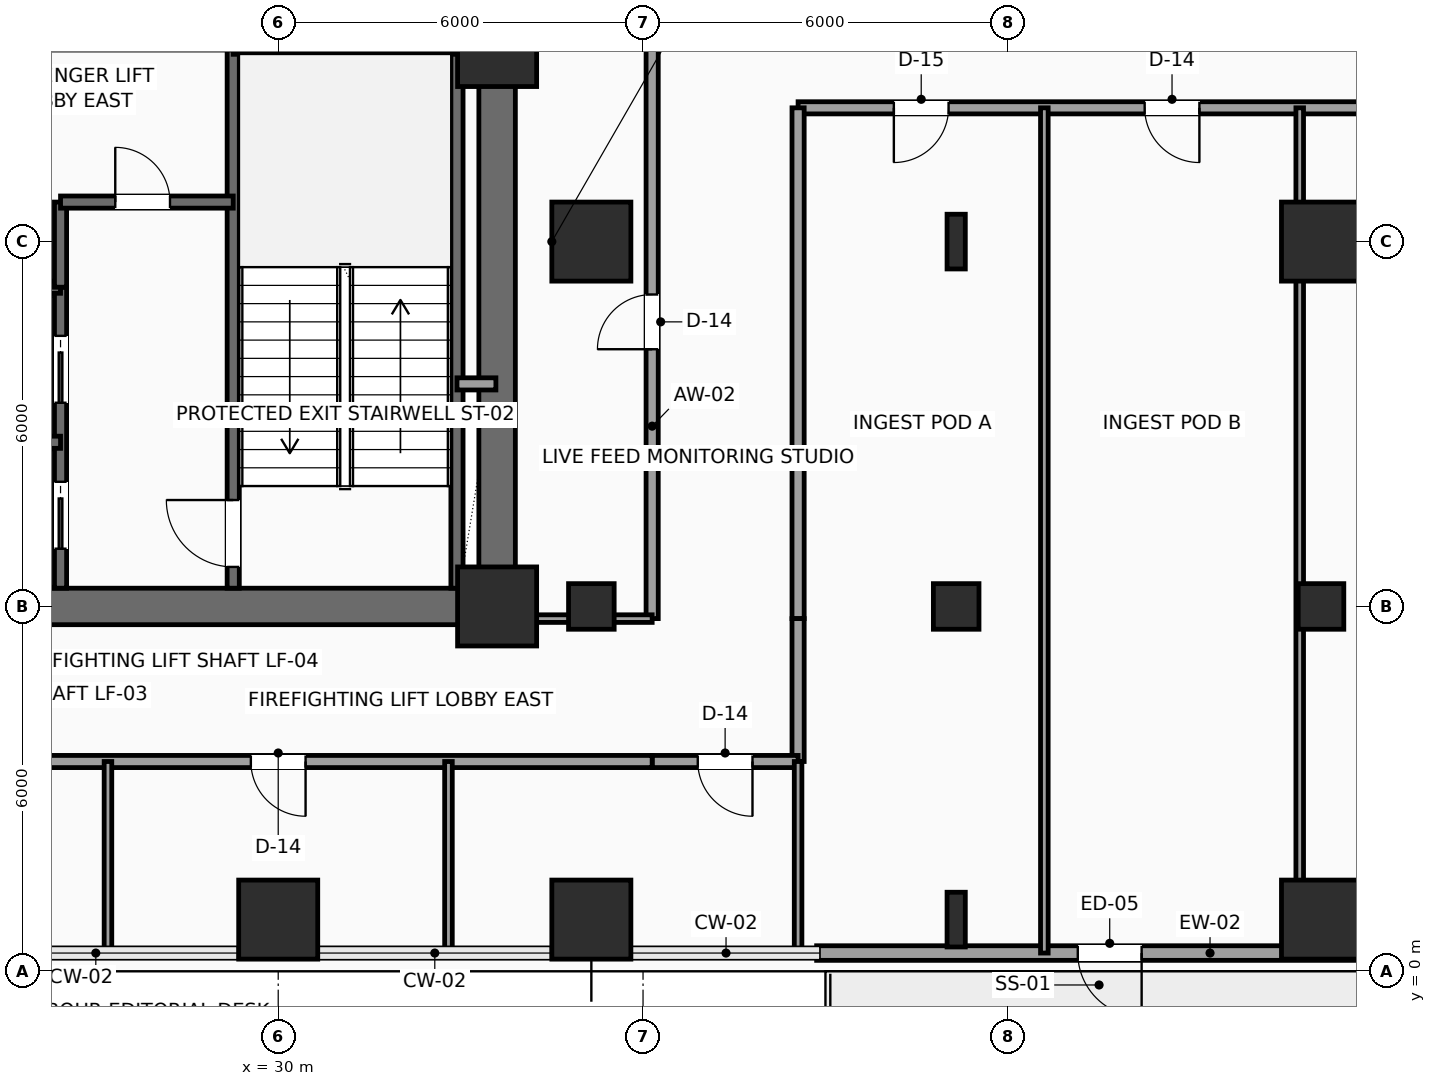
"""IFC4 building model, lengths in metres.
Left out: names, types, materials, properties, quantities, classifications, styles, units other than length and angle.
Written with IfcOpenShell. Run it as: python <this file> out.ifc"""

import sys

from ifc_helpers import new_model, si_unit, direction, frame, frame_2d, origin, origin_2d, place, context, subcontext, project, spatial, rectangle, hollow_rectangle, i_section, extrude, element, fill, save


model = new_model("IFC4")
c1 = context("Model", 3, precision=1e-05, world=origin(), true_north=direction((0.0, 1.0)))
c2 = subcontext(c1, "Body", "Model", "MODEL_VIEW")
j1 = project(units=[si_unit("LENGTHUNIT", "METRE"), si_unit("PLANEANGLEUNIT", "RADIAN")], contexts=[c1])
p1 = place(None, origin())
s1 = spatial("IfcSite", under=j1, at=p1, CompositionType="ELEMENT")
p2 = place(p1, origin())
s2 = spatial("IfcBuilding", under=s1, at=p2, CompositionType="ELEMENT")
p3 = place(p2, frame((0.0, 0.0, 44.1)))
s3 = spatial("IfcBuildingStorey", under=s2, at=p3, CompositionType="ELEMENT", Elevation=44.1)
for number, where, z_axis, x_axis in (
    (1, (33.6, 6.0, 0.0), (0.0, 0.0, 1.0), (1.0, 0.0, 0.0)),
    (2, (33.6, 15.2, 0.0), (0.0, 0.0, 1.0), (1.0, 0.0, 0.0)),
    (3, (30.0, 0.85, 0.0), (0.0, 0.0, 1.0), (1.0, 0.0, 0.0)),
    (4, (35.15, 0.85, 0.0), (0.0, 0.0, 1.0), (1.0, 0.0, 0.0)),
):
    element("IfcColumn", number, at=place(p3, frame(where, z_axis=z_axis, x_axis=x_axis)), inside=s3, PredefinedType="COLUMN", context=c2, shape_type="SweptSolid", body=[
        extrude(rectangle(XDim=1.3, YDim=1.3, at=origin_2d()), origin(), (0.0, 0.0, 1.0), 3.9),
    ])
p4 = place(p3, frame((35.15, 6.0, 0.0), z_axis=(0.0, 0.0, 1.0), x_axis=(1.0, 0.0, 0.0)))
e5 = element("IfcColumn", 5, at=p4, inside=s3, PredefinedType="COLUMN", context=c2, shape_type="SweptSolid", body=[
    extrude(hollow_rectangle(XDim=0.75, YDim=0.75, WallThickness=0.035, InnerFilletRadius=0.035, OuterFilletRadius=0.05, at=origin_2d()), origin(), (0.0, 0.0, 1.0), 3.9),
])
p5 = place(p3, frame((35.15, 12.0, 0.0), z_axis=(0.0, 0.0, 1.0), x_axis=(1.0, 0.0, 0.0)))
e6 = element("IfcColumn", 6, at=p5, inside=s3, PredefinedType="COLUMN", context=c2, shape_type="SweptSolid", body=[
    extrude(rectangle(XDim=1.3, YDim=1.3, at=origin_2d()), origin(), (0.0, 0.0, 1.0), 3.9),
])
p6 = place(p3, frame((41.15, 0.85, 0.0), z_axis=(0.0, 0.0, 1.0), x_axis=(1.0, 0.0, 0.0)))
e7 = element("IfcColumn", 7, at=p6, inside=s3, PredefinedType="COLUMN", context=c2, shape_type="SweptSolid", body=[
    extrude(i_section(OverallWidth=0.3, OverallDepth=0.9, WebThickness=0.019, FlangeThickness=0.035, FilletRadius=0.03, at=origin_2d()), origin(), (0.0, 0.0, 1.0), 3.9),
])
p7 = place(p3, frame((41.15, 6.0, 0.0), z_axis=(0.0, 0.0, 1.0), x_axis=(1.0, 0.0, 0.0)))
e8 = element("IfcColumn", 8, at=p7, inside=s3, PredefinedType="COLUMN", context=c2, shape_type="SweptSolid", body=[
    extrude(hollow_rectangle(XDim=0.75, YDim=0.75, WallThickness=0.035, InnerFilletRadius=0.035, OuterFilletRadius=0.05, at=origin_2d()), origin(), (0.0, 0.0, 1.0), 3.9),
])
p8 = place(p3, frame((41.15, 12.0, 0.0), z_axis=(0.0, 0.0, 1.0), x_axis=(1.0, 0.0, 0.0)))
e9 = element("IfcColumn", 9, at=p8, inside=s3, PredefinedType="COLUMN", context=c2, shape_type="SweptSolid", body=[
    extrude(i_section(OverallWidth=0.3, OverallDepth=0.9, WebThickness=0.019, FlangeThickness=0.035, FilletRadius=0.03, at=origin_2d()), origin(), (0.0, 0.0, 1.0), 3.9),
])
p9 = place(p3, frame((47.15, 0.85, 0.0), z_axis=(0.0, 0.0, 1.0), x_axis=(1.0, 0.0, 0.0)))
e10 = element("IfcColumn", 10, at=p9, inside=s3, PredefinedType="COLUMN", context=c2, shape_type="SweptSolid", body=[
    extrude(rectangle(XDim=1.3, YDim=1.3, at=origin_2d()), origin(), (0.0, 0.0, 1.0), 3.9),
])
p10 = place(p3, frame((47.15, 6.0, 0.0), z_axis=(0.0, 0.0, 1.0), x_axis=(1.0, 0.0, 0.0)))
e11 = element("IfcColumn", 11, at=p10, inside=s3, PredefinedType="COLUMN", context=c2, shape_type="SweptSolid", body=[
    extrude(hollow_rectangle(XDim=0.75, YDim=0.75, WallThickness=0.035, InnerFilletRadius=0.035, OuterFilletRadius=0.05, at=origin_2d()), origin(), (0.0, 0.0, 1.0), 3.9),
])
p11 = place(p3, frame((47.15, 12.0, 0.0), z_axis=(0.0, 0.0, 1.0), x_axis=(1.0, 0.0, 0.0)))
e12 = element("IfcColumn", 12, at=p11, inside=s3, PredefinedType="COLUMN", context=c2, shape_type="SweptSolid", body=[
    extrude(rectangle(XDim=1.3, YDim=1.3, at=origin_2d()), origin(), (0.0, 0.0, 1.0), 3.9),
])
p12 = place(p3, frame((48.145, 0.3, 0.0), z_axis=(0.0, 0.0, 1.0), x_axis=(-1.0, 0.0, 0.0)))
e13 = element("IfcWall", 13, at=p12, inside=s3, PredefinedType="SOLIDWALL", context=c2, shape_type="SweptSolid", body=[
    extrude(rectangle(XDim=9.29, YDim=0.24, at=frame_2d((4.645, 0.0))), origin(), (0.0, 0.0, 1.0), 3.65),
])
p13 = place(p12, frame((3.945, 0.0, 0.0)))
e14 = element("IfcOpeningElement", 14, at=p13, cuts=e13, PredefinedType="OPENING", context=c2, shape_type="SweptSolid", body=[
    extrude(rectangle(XDim=1.05, YDim=2.2, at=frame_2d((0.525, 1.1))), frame((0.0, 0.13, 0.0), z_axis=(0.0, -1.0, 0.0), x_axis=(1.0, 0.0, 0.0)), (0.0, 0.0, 1.0), 0.26),
])
p14 = place(p3, frame((24.0, 6.0, 0.0), z_axis=(0.0, 0.0, 1.0), x_axis=(1.0, 0.0, 0.0)))
e15 = element("IfcWall", 15, at=p14, inside=s3, PredefinedType="SHEAR", context=c2, shape_type="SweptSolid", body=[
    extrude(rectangle(XDim=9.6, YDim=0.6, at=frame_2d((4.8, 0.0))), origin(), (0.0, 0.0, 1.0), 3.65),
])
p15 = place(p3, frame((33.6, 6.0, 0.0), z_axis=(0.0, 0.0, 1.0), x_axis=(0.0, 1.0, 0.0)))
e16 = element("IfcWall", 16, at=p15, inside=s3, PredefinedType="SHEAR", context=c2, shape_type="SweptSolid", body=[
    extrude(rectangle(XDim=12.0, YDim=0.6, at=frame_2d((6.0, 0.0))), origin(), (0.0, 0.0, 1.0), 3.65),
])
p16 = place(p15, frame((10.2, 0.0, 0.0)))
e17 = element("IfcOpeningElement", 17, at=p16, cuts=e16, PredefinedType="OPENING", context=c2, shape_type="SweptSolid", body=[
    extrude(rectangle(XDim=0.9, YDim=2.15, at=frame_2d((0.45, 1.075))), frame((0.0, 0.31, 0.0), z_axis=(0.0, -1.0, 0.0), x_axis=(1.0, 0.0, 0.0)), (0.0, 0.0, 1.0), 0.62),
])
p17 = place(p3, frame((29.26, 6.3, 0.0), z_axis=(0.0, 0.0, 1.0), x_axis=(0.0, 1.0, 0.0)))
e18 = element("IfcWall", 18, at=p17, inside=s3, PredefinedType="SHEAR", context=c2, shape_type="SweptSolid", body=[
    extrude(rectangle(XDim=8.88, YDim=0.2, at=frame_2d((4.44, 0.0))), origin(), (0.0, 0.0, 1.0), 3.65),
])
p18 = place(p17, frame((0.35, 0.0, 0.0)))
e19 = element("IfcOpeningElement", 19, at=p18, cuts=e18, PredefinedType="OPENING", context=c2, shape_type="SweptSolid", body=[
    extrude(rectangle(XDim=1.1, YDim=2.2, at=frame_2d((0.55, 1.1))), frame((0.0, 0.11, 0.0), z_axis=(0.0, -1.0, 0.0), x_axis=(1.0, 0.0, 0.0)), (0.0, 0.0, 1.0), 0.22),
])
p19 = place(p3, frame((32.94, 6.3, 0.0), z_axis=(0.0, 0.0, 1.0), x_axis=(0.0, 1.0, 0.0)))
e20 = element("IfcWall", 20, at=p19, inside=s3, PredefinedType="SHEAR", context=c2, shape_type="SweptSolid", body=[
    extrude(rectangle(XDim=8.88, YDim=0.2, at=frame_2d((4.44, 0.0))), origin(), (0.0, 0.0, 1.0), 3.65),
])
p20 = place(p3, frame((29.26, 15.18, 0.0), z_axis=(0.0, 0.0, 1.0), x_axis=(1.0, 0.0, 0.0)))
e21 = element("IfcWall", 21, at=p20, inside=s3, PredefinedType="SHEAR", context=c2, shape_type="SweptSolid", body=[
    extrude(rectangle(XDim=4.04, YDim=0.2, at=frame_2d((2.02, 0.0))), origin(), (0.0, 0.0, 1.0), 3.65),
])
p21 = place(p3, frame((26.42, 6.3, 0.0), z_axis=(0.0, 0.0, 1.0), x_axis=(0.0, 1.0, 0.0)))
e22 = element("IfcWall", 22, at=p21, inside=s3, PredefinedType="SHEAR", context=c2, shape_type="SweptSolid", body=[
    extrude(rectangle(XDim=4.95, YDim=0.2, at=frame_2d((2.475, 0.0))), origin(), (0.0, 0.0, 1.0), 3.65),
])
p22 = place(p21, frame((0.65, 0.0, 0.0)))
e23 = element("IfcOpeningElement", 23, at=p22, cuts=e22, PredefinedType="OPENING", context=c2, shape_type="SweptSolid", body=[
    extrude(rectangle(XDim=1.1, YDim=2.2, at=frame_2d((0.55, 1.1))), frame((0.0, 0.11, 0.0), z_axis=(0.0, -1.0, 0.0), x_axis=(1.0, 0.0, 0.0)), (0.0, 0.0, 1.0), 0.22),
])
p23 = place(p21, frame((3.05, 0.0, 0.0)))
e24 = element("IfcOpeningElement", 24, at=p23, cuts=e22, PredefinedType="OPENING", context=c2, shape_type="SweptSolid", body=[
    extrude(rectangle(XDim=1.1, YDim=2.2, at=frame_2d((0.55, 1.1))), frame((0.0, 0.11, 0.0), z_axis=(0.0, -1.0, 0.0), x_axis=(1.0, 0.0, 0.0)), (0.0, 0.0, 1.0), 0.22),
])
for number, where, z_axis, x_axis in (
    (25, (24.25, 8.7, 0.0), (0.0, 0.0, 1.0), (1.0, 0.0, 0.0)),
    (26, (24.25, 11.25, 0.0), (0.0, 0.0, 1.0), (1.0, 0.0, 0.0)),
):
    element("IfcWall", number, at=place(p3, frame(where, z_axis=z_axis, x_axis=x_axis)), inside=s3, PredefinedType="SHEAR", context=c2, shape_type="SweptSolid", body=[
        extrude(rectangle(XDim=2.17, YDim=0.2, at=frame_2d((1.085, 0.0))), origin(), (0.0, 0.0, 1.0), 3.65),
    ])
p24 = place(p3, frame((26.42, 11.25, 0.0), z_axis=(0.0, 0.0, 1.0), x_axis=(0.0, 1.0, 0.0)))
e27 = element("IfcWall", 27, at=p24, inside=s3, PredefinedType="SHEAR", context=c2, shape_type="SweptSolid", body=[
    extrude(rectangle(XDim=1.4, YDim=0.2, at=frame_2d((0.7, 0.0))), origin(), (0.0, 0.0, 1.0), 3.65),
])
p25 = place(p3, frame((26.42, 12.65, 0.0), z_axis=(0.0, 0.0, 1.0), x_axis=(1.0, 0.0, 0.0)))
e28 = element("IfcWall", 28, at=p25, inside=s3, PredefinedType="SHEAR", context=c2, shape_type="SweptSolid", body=[
    extrude(rectangle(XDim=2.84, YDim=0.2, at=frame_2d((1.42, 0.0))), origin(), (0.0, 0.0, 1.0), 3.65),
])
p26 = place(p25, frame((0.9, 0.0, 0.0)))
e29 = element("IfcOpeningElement", 29, at=p26, cuts=e28, PredefinedType="OPENING", context=c2, shape_type="SweptSolid", body=[
    extrude(rectangle(XDim=0.9, YDim=2.15, at=frame_2d((0.45, 1.075))), frame((0.0, 0.11, 0.0), z_axis=(0.0, -1.0, 0.0), x_axis=(1.0, 0.0, 0.0)), (0.0, 0.0, 1.0), 0.22),
])
p27 = place(p3, frame((32.94, 9.66, 0.0), z_axis=(0.0, 0.0, 1.0), x_axis=(1.0, 0.0, 0.0)))
e30 = element("IfcWall", 30, at=p27, inside=s3, PredefinedType="SOLIDWALL", context=c2, shape_type="SweptSolid", body=[
    extrude(rectangle(XDim=0.64, YDim=0.2, at=frame_2d((0.32, 0.0))), origin(), (0.0, 0.0, 1.0), 3.65),
])
p28 = place(p3, frame((36.15, 5.8, 0.0), z_axis=(0.0, 0.0, 1.0), x_axis=(0.0, 1.0, 0.0)))
e31 = element("IfcWall", 31, at=p28, inside=s3, PredefinedType="PARTITIONING", context=c2, shape_type="SweptSolid", body=[
    extrude(rectangle(XDim=10.08, YDim=0.2, at=frame_2d((5.04, 0.0))), origin(), (0.0, 0.0, 1.0), 3.65),
])
p29 = place(p28, frame((4.43, 0.0, 0.0)))
e32 = element("IfcOpeningElement", 32, at=p29, cuts=e31, PredefinedType="OPENING", context=c2, shape_type="SweptSolid", body=[
    extrude(rectangle(XDim=0.9, YDim=2.1, at=frame_2d((0.45, 1.05))), frame((0.0, 0.11, 0.0), z_axis=(0.0, -1.0, 0.0), x_axis=(1.0, 0.0, 0.0)), (0.0, 0.0, 1.0), 0.22),
])
p30 = place(p3, frame((50.9, 14.2, 0.0), z_axis=(0.0, 0.0, 1.0), x_axis=(-1.0, 0.0, 0.0)))
e33 = element("IfcWall", 33, at=p30, inside=s3, PredefinedType="PARTITIONING", context=c2, shape_type="SweptSolid", body=[
    extrude(rectangle(XDim=12.35, YDim=0.2, at=frame_2d((6.175, 0.0))), origin(), (0.0, 0.0, 1.0), 3.65),
])
p31 = place(p30, frame((9.875, 0.0, 0.0)))
e34 = element("IfcOpeningElement", 34, at=p31, cuts=e33, PredefinedType="OPENING", context=c2, shape_type="SweptSolid", body=[
    extrude(rectangle(XDim=0.9, YDim=2.1, at=frame_2d((0.45, 1.05))), frame((0.0, 0.11, 0.0), z_axis=(0.0, -1.0, 0.0), x_axis=(1.0, 0.0, 0.0)), (0.0, 0.0, 1.0), 0.22),
])
p32 = place(p30, frame((5.75, 0.0, 0.0)))
e35 = element("IfcOpeningElement", 35, at=p32, cuts=e33, PredefinedType="OPENING", context=c2, shape_type="SweptSolid", body=[
    extrude(rectangle(XDim=0.9, YDim=2.1, at=frame_2d((0.45, 1.05))), frame((0.0, 0.11, 0.0), z_axis=(0.0, -1.0, 0.0), x_axis=(1.0, 0.0, 0.0)), (0.0, 0.0, 1.0), 0.22),
])
p33 = place(p30, frame((1.6, 0.0, 0.0)))
e36 = element("IfcOpeningElement", 36, at=p33, cuts=e33, PredefinedType="OPENING", context=c2, shape_type="SweptSolid", body=[
    extrude(rectangle(XDim=0.9, YDim=2.1, at=frame_2d((0.45, 1.05))), frame((0.0, 0.11, 0.0), z_axis=(0.0, -1.0, 0.0), x_axis=(1.0, 0.0, 0.0)), (0.0, 0.0, 1.0), 0.22),
])
p34 = place(p3, frame((38.55, 14.2, 0.0), z_axis=(0.0, 0.0, 1.0), x_axis=(0.0, -1.0, 0.0)))
e37 = element("IfcWall", 37, at=p34, inside=s3, PredefinedType="PARTITIONING", context=c2, shape_type="SweptSolid", body=[
    extrude(rectangle(XDim=8.4, YDim=0.2, at=frame_2d((4.2, 0.0))), origin(), (0.0, 0.0, 1.0), 3.65),
])
p35 = place(p3, frame((38.55, 5.8, 0.0), z_axis=(0.0, 0.0, 1.0), x_axis=(0.0, -1.0, 0.0)))
e38 = element("IfcWall", 38, at=p35, inside=s3, PredefinedType="PARTITIONING", context=c2, shape_type="SweptSolid", body=[
    extrude(rectangle(XDim=2.35, YDim=0.2, at=frame_2d((1.175, 0.0))), origin(), (0.0, 0.0, 1.0), 3.65),
])
p36 = place(p3, frame((38.55, 3.45, 0.0), z_axis=(0.0, 0.0, 1.0), x_axis=(-1.0, 0.0, 0.0)))
e39 = element("IfcWall", 39, at=p36, inside=s3, PredefinedType="PARTITIONING", context=c2, shape_type="SweptSolid", body=[
    extrude(rectangle(XDim=2.4, YDim=0.2, at=frame_2d((1.2, 0.0))), origin(), (0.0, 0.0, 1.0), 3.142),
])
p37 = place(p36, frame((0.75, 0.0, 0.0)))
e40 = element("IfcOpeningElement", 40, at=p37, cuts=e39, PredefinedType="OPENING", context=c2, shape_type="SweptSolid", body=[
    extrude(rectangle(XDim=0.9, YDim=2.1, at=frame_2d((0.45, 1.05))), frame((0.0, 0.11, 0.0), z_axis=(0.0, -1.0, 0.0), x_axis=(1.0, 0.0, 0.0)), (0.0, 0.0, 1.0), 0.22),
])
p38 = place(p3, frame((36.15, 3.45, 0.0), z_axis=(0.0, 0.0, 1.0), x_axis=(-1.0, 0.0, 0.0)))
e41 = element("IfcWall", 41, at=p38, inside=s3, PredefinedType="PARTITIONING", context=c2, shape_type="SweptSolid", body=[
    extrude(rectangle(XDim=14.6, YDim=0.2, at=frame_2d((7.3, 0.0))), origin(), (0.0, 0.0, 1.0), 3.142),
])
p39 = place(p38, frame((11.325, 0.0, 0.0)))
e42 = element("IfcOpeningElement", 42, at=p39, cuts=e41, PredefinedType="OPENING", context=c2, shape_type="SweptSolid", body=[
    extrude(rectangle(XDim=0.9, YDim=2.1, at=frame_2d((0.45, 1.05))), frame((0.0, 0.11, 0.0), z_axis=(0.0, -1.0, 0.0), x_axis=(1.0, 0.0, 0.0)), (0.0, 0.0, 1.0), 0.22),
])
p40 = place(p38, frame((5.7, 0.0, 0.0)))
e43 = element("IfcOpeningElement", 43, at=p40, cuts=e41, PredefinedType="OPENING", context=c2, shape_type="SweptSolid", body=[
    extrude(rectangle(XDim=0.9, YDim=2.1, at=frame_2d((0.45, 1.05))), frame((0.0, 0.11, 0.0), z_axis=(0.0, -1.0, 0.0), x_axis=(1.0, 0.0, 0.0)), (0.0, 0.0, 1.0), 0.22),
])
for number, where, z_axis, x_axis in (
    (44, (42.6, 0.3, 0.0), (0.0, 0.0, 1.0), (0.0, 1.0, 0.0)),
    (45, (46.8, 0.3, 0.0), (0.0, 0.0, 1.0), (0.0, 1.0, 0.0)),
):
    element("IfcWall", number, at=place(p3, frame(where, z_axis=z_axis, x_axis=x_axis)), inside=s3, PredefinedType="PARTITIONING", context=c2, shape_type="SweptSolid", body=[
        extrude(rectangle(XDim=13.9, YDim=0.125, at=frame_2d((6.95, 0.0))), origin(), (0.0, 0.0, 1.0), 3.65),
    ])
for number, where, z_axis, x_axis in (
    (46, (27.2, 0.3, 0.0), (0.0, 0.0, 1.0), (0.0, 1.0, 0.0)),
    (47, (32.8, 0.3, 0.0), (0.0, 0.0, 1.0), (0.0, 1.0, 0.0)),
    (48, (38.55, 0.3, 0.0), (0.0, 0.0, 1.0), (0.0, 1.0, 0.0)),
):
    element("IfcWall", number, at=place(p3, frame(where, z_axis=z_axis, x_axis=x_axis)), inside=s3, PredefinedType="PARTITIONING", context=c2, shape_type="SweptSolid", body=[
        extrude(rectangle(XDim=3.15, YDim=0.125, at=frame_2d((1.575, 0.0))), origin(), (0.0, 0.0, 1.0), 3.65),
    ])
p41 = place(p3, frame((33.65, 5.8, 0.0), z_axis=(0.0, 0.0, 1.0), x_axis=(1.0, 0.0, 0.0)))
e49 = element("IfcWall", 49, at=p41, inside=s3, PredefinedType="PARTITIONING", context=c2, shape_type="SweptSolid", body=[
    extrude(rectangle(XDim=2.5, YDim=0.125, at=frame_2d((1.25, 0.0))), origin(), (0.0, 0.0, 1.0), 2.992),
])
p42 = place(p13, origin())
e50 = element("IfcDoor", 50, at=p42, inside=s3, OperationType="SINGLE_SWING_LEFT", PredefinedType="DOOR", context=c2, shape_type="SweptSolid", body=[
    extrude(rectangle(XDim=1.05, YDim=2.2, at=frame_2d((0.525, 1.1))), frame((0.0, 0.025, 0.0), z_axis=(0.0, -1.0, 0.0), x_axis=(1.0, 0.0, 0.0)), (0.0, 0.0, 1.0), 0.05),
])
fill(e14, e50)
p43 = place(p18, origin())
e51 = element("IfcDoor", 51, at=p43, inside=s3, OperationType="SINGLE_SWING_RIGHT", PredefinedType="DOOR", context=c2, shape_type="SweptSolid", body=[
    extrude(rectangle(XDim=1.1, YDim=2.2, at=frame_2d((0.55, 1.1))), frame((0.0, 0.025, 0.0), z_axis=(0.0, -1.0, 0.0), x_axis=(1.0, 0.0, 0.0)), (0.0, 0.0, 1.0), 0.05),
])
fill(e19, e51)
p44 = place(p22, origin())
e52 = element("IfcDoor", 52, at=p44, inside=s3, OperationType="SLIDING_TO_LEFT", PredefinedType="DOOR", context=c2, shape_type="SweptSolid", body=[
    extrude(rectangle(XDim=1.1, YDim=2.2, at=frame_2d((0.55, 1.1))), frame((0.0, 0.025, 0.0), z_axis=(0.0, -1.0, 0.0), x_axis=(1.0, 0.0, 0.0)), (0.0, 0.0, 1.0), 0.05),
])
fill(e23, e52)
p45 = place(p23, origin())
e53 = element("IfcDoor", 53, at=p45, inside=s3, OperationType="SLIDING_TO_LEFT", PredefinedType="DOOR", context=c2, shape_type="SweptSolid", body=[
    extrude(rectangle(XDim=1.1, YDim=2.2, at=frame_2d((0.55, 1.1))), frame((0.0, 0.025, 0.0), z_axis=(0.0, -1.0, 0.0), x_axis=(1.0, 0.0, 0.0)), (0.0, 0.0, 1.0), 0.05),
])
fill(e24, e53)
p46 = place(p26, origin())
e54 = element("IfcDoor", 54, at=p46, inside=s3, OperationType="SINGLE_SWING_LEFT", PredefinedType="DOOR", context=c2, shape_type="SweptSolid", body=[
    extrude(rectangle(XDim=0.9, YDim=2.15, at=frame_2d((0.45, 1.075))), frame((0.0, 0.025, 0.0), z_axis=(0.0, -1.0, 0.0), x_axis=(1.0, 0.0, 0.0)), (0.0, 0.0, 1.0), 0.05),
])
fill(e29, e54)
p47 = place(p29, origin())
e55 = element("IfcDoor", 55, at=p47, inside=s3, OperationType="SINGLE_SWING_LEFT", PredefinedType="DOOR", context=c2, shape_type="SweptSolid", body=[
    extrude(rectangle(XDim=0.9, YDim=2.1, at=frame_2d((0.45, 1.05))), frame((0.0, 0.025, 0.0), z_axis=(0.0, -1.0, 0.0), x_axis=(1.0, 0.0, 0.0)), (0.0, 0.0, 1.0), 0.05),
])
fill(e32, e55)
p48 = place(p31, origin())
e56 = element("IfcDoor", 56, at=p48, inside=s3, OperationType="SINGLE_SWING_RIGHT", PredefinedType="DOOR", context=c2, shape_type="SweptSolid", body=[
    extrude(rectangle(XDim=0.9, YDim=2.1, at=frame_2d((0.45, 1.05))), frame((0.0, 0.025, 0.0), z_axis=(0.0, -1.0, 0.0), x_axis=(1.0, 0.0, 0.0)), (0.0, 0.0, 1.0), 0.05),
])
fill(e34, e56)
p49 = place(p32, origin())
e57 = element("IfcDoor", 57, at=p49, inside=s3, OperationType="SINGLE_SWING_LEFT", PredefinedType="DOOR", context=c2, shape_type="SweptSolid", body=[
    extrude(rectangle(XDim=0.9, YDim=2.1, at=frame_2d((0.45, 1.05))), frame((0.0, 0.025, 0.0), z_axis=(0.0, -1.0, 0.0), x_axis=(1.0, 0.0, 0.0)), (0.0, 0.0, 1.0), 0.05),
])
fill(e35, e57)
p50 = place(p37, origin())
e58 = element("IfcDoor", 58, at=p50, inside=s3, OperationType="SINGLE_SWING_LEFT", PredefinedType="DOOR", context=c2, shape_type="SweptSolid", body=[
    extrude(rectangle(XDim=0.9, YDim=2.1, at=frame_2d((0.45, 1.05))), frame((0.0, 0.025, 0.0), z_axis=(0.0, -1.0, 0.0), x_axis=(1.0, 0.0, 0.0)), (0.0, 0.0, 1.0), 0.05),
])
fill(e40, e58)
p51 = place(p40, origin())
e59 = element("IfcDoor", 59, at=p51, inside=s3, OperationType="SINGLE_SWING_LEFT", PredefinedType="DOOR", context=c2, shape_type="SweptSolid", body=[
    extrude(rectangle(XDim=0.9, YDim=2.1, at=frame_2d((0.45, 1.05))), frame((0.0, 0.025, 0.0), z_axis=(0.0, -1.0, 0.0), x_axis=(1.0, 0.0, 0.0)), (0.0, 0.0, 1.0), 0.05),
])
fill(e43, e59)
save(model, sys.argv[1])
